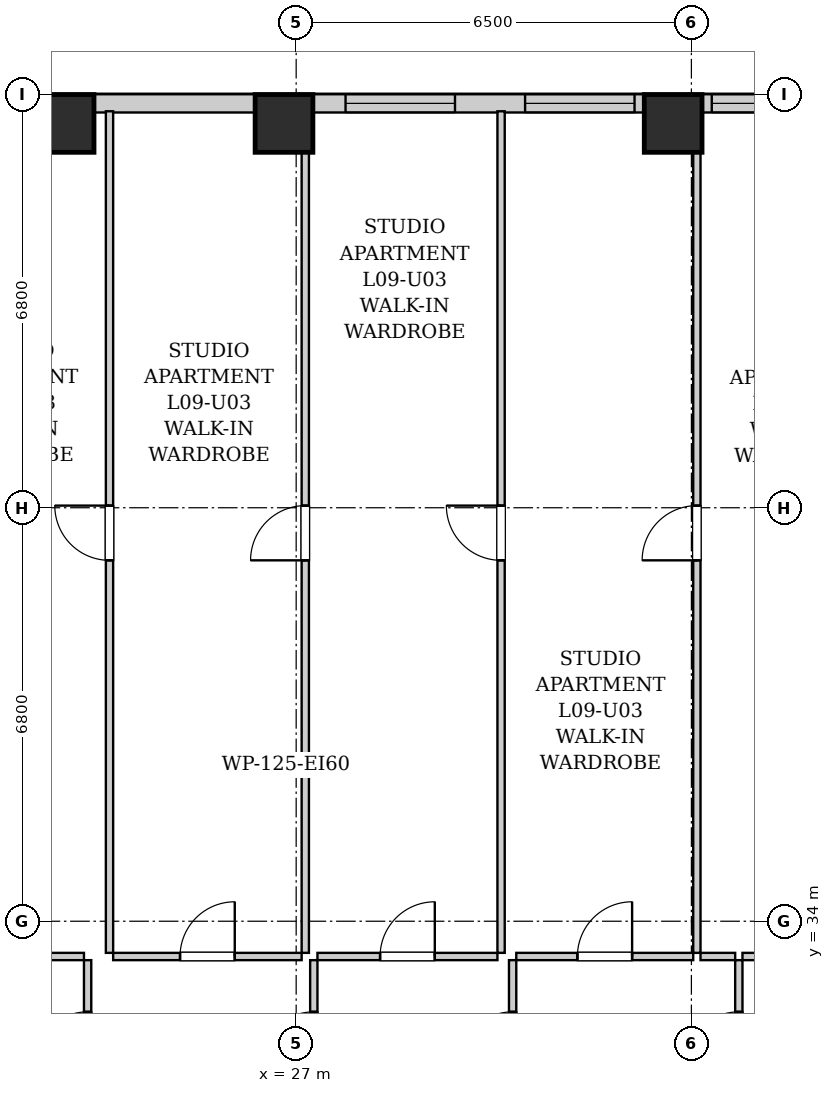
"""IFC4 building model, lengths in metres.
Left out: names, types, materials, properties, quantities, classifications, styles, units other than length and angle.
Written with IfcOpenShell. Run it as: python <this file> out.ifc"""

import sys

from ifc_helpers import new_model, si_unit, direction, frame, frame_2d, origin, origin_2d, place, context, subcontext, project, spatial, rectangle, extrude, element, fill, save


model = new_model("IFC4")
c1 = context("Model", 3, precision=1e-05, world=origin(), true_north=direction((0.0, 1.0)))
c2 = subcontext(c1, "Body", "Model", "MODEL_VIEW")
j1 = project(units=[si_unit("LENGTHUNIT", "METRE"), si_unit("PLANEANGLEUNIT", "RADIAN")], contexts=[c1])
p1 = place(None, origin())
s1 = spatial("IfcSite", under=j1, at=p1, CompositionType="ELEMENT")
p2 = place(p1, origin())
s2 = spatial("IfcBuilding", under=s1, at=p2, CompositionType="ELEMENT")
p3 = place(p2, frame((0.0, 0.0, 38.6)))
s3 = spatial("IfcBuildingStorey", under=s2, at=p3, CompositionType="ELEMENT", Elevation=38.6)
for number, where, z_axis, x_axis in (
    (1, (23.2, 47.12, 0.0), (0.0, 0.0, 1.0), (1.0, 0.0, 0.0)),
    (2, (26.8, 47.12, 0.0), (0.0, 0.0, 1.0), (1.0, 0.0, 0.0)),
    (3, (33.2, 47.12, 0.0), (0.0, 0.0, 1.0), (1.0, 0.0, 0.0)),
):
    element("IfcColumn", number, at=place(p3, frame(where, z_axis=z_axis, x_axis=x_axis)), inside=s3, PredefinedType="COLUMN", context=c2, shape_type="SweptSolid", body=[
        extrude(rectangle(XDim=0.95, YDim=0.95, at=origin_2d()), origin(), (0.0, 0.0, 1.0), 3.2),
    ])
p4 = place(p3, frame((10.0, 47.45, 0.0), z_axis=(0.0, 0.0, 1.0), x_axis=(1.0, 0.0, 0.0)))
e4 = element("IfcWall", 4, at=p4, inside=s3, PredefinedType="SOLIDWALL", context=c2, shape_type="SweptSolid", body=[
    extrude(rectangle(XDim=25.7, YDim=0.3, at=frame_2d((12.85, 0.0))), origin(), (0.0, 0.0, 1.0), 1.975),
])
p5 = place(p4, frame((1.73, 0.0, 0.55)))
e5 = element("IfcOpeningElement", 5, at=p5, cuts=e4, PredefinedType="OPENING", context=c2, shape_type="SweptSolid", body=[
    extrude(rectangle(XDim=1.8, YDim=1.2, at=frame_2d((0.9, 0.6))), frame((0.0, 0.16, 0.0), z_axis=(0.0, -1.0, 0.0), x_axis=(1.0, 0.0, 0.0)), (0.0, 0.0, 1.0), 0.32),
])
p6 = place(p4, frame((4.961, 0.0, 0.55)))
e6 = element("IfcOpeningElement", 6, at=p6, cuts=e4, PredefinedType="OPENING", context=c2, shape_type="SweptSolid", body=[
    extrude(rectangle(XDim=1.8, YDim=1.2, at=frame_2d((0.9, 0.6))), frame((0.0, 0.16, 0.0), z_axis=(0.0, -1.0, 0.0), x_axis=(1.0, 0.0, 0.0)), (0.0, 0.0, 1.0), 0.32),
])
p7 = place(p4, frame((8.435, 0.0, 0.55)))
e7 = element("IfcOpeningElement", 7, at=p7, cuts=e4, PredefinedType="OPENING", context=c2, shape_type="SweptSolid", body=[
    extrude(rectangle(XDim=1.8, YDim=1.2, at=frame_2d((0.9, 0.6))), frame((0.0, 0.16, 0.0), z_axis=(0.0, -1.0, 0.0), x_axis=(1.0, 0.0, 0.0)), (0.0, 0.0, 1.0), 0.32),
])
p8 = place(p4, frame((11.15, 0.0, 0.55)))
e8 = element("IfcOpeningElement", 8, at=p8, cuts=e4, PredefinedType="OPENING", context=c2, shape_type="SweptSolid", body=[
    extrude(rectangle(XDim=1.35, YDim=1.2, at=frame_2d((0.675, 0.6))), frame((0.0, 0.16, 0.0), z_axis=(0.0, -1.0, 0.0), x_axis=(1.0, 0.0, 0.0)), (0.0, 0.0, 1.0), 0.32),
])
p9 = place(p4, frame((17.812, 0.0, 0.55)))
e9 = element("IfcOpeningElement", 9, at=p9, cuts=e4, PredefinedType="OPENING", context=c2, shape_type="SweptSolid", body=[
    extrude(rectangle(XDim=1.8, YDim=1.2, at=frame_2d((0.9, 0.6))), frame((0.0, 0.16, 0.0), z_axis=(0.0, -1.0, 0.0), x_axis=(1.0, 0.0, 0.0)), (0.0, 0.0, 1.0), 0.32),
])
p10 = place(p4, frame((20.765, 0.0, 0.55)))
e10 = element("IfcOpeningElement", 10, at=p10, cuts=e4, PredefinedType="OPENING", context=c2, shape_type="SweptSolid", body=[
    extrude(rectangle(XDim=1.8, YDim=1.2, at=frame_2d((0.9, 0.6))), frame((0.0, 0.16, 0.0), z_axis=(0.0, -1.0, 0.0), x_axis=(1.0, 0.0, 0.0)), (0.0, 0.0, 1.0), 0.32),
])
p11 = place(p4, frame((23.835, 0.0, 0.55)))
e11 = element("IfcOpeningElement", 11, at=p11, cuts=e4, PredefinedType="OPENING", context=c2, shape_type="SweptSolid", body=[
    extrude(rectangle(XDim=1.35, YDim=1.2, at=frame_2d((0.675, 0.6))), frame((0.0, 0.16, 0.0), z_axis=(0.0, -1.0, 0.0), x_axis=(1.0, 0.0, 0.0)), (0.0, 0.0, 1.0), 0.32),
])
p12 = place(p3, frame((23.57, 30.76, 0.0), z_axis=(0.0, 0.0, 1.0), x_axis=(0.0, 1.0, 0.0)))
e12 = element("IfcWall", 12, at=p12, inside=s3, PredefinedType="PARTITIONING", context=c2, shape_type="SweptSolid", body=[
    extrude(rectangle(XDim=2.6, YDim=0.12, at=frame_2d((1.3, 0.0))), origin(), (0.0, 0.0, 1.0), 2.94),
])
p13 = place(p12, frame((0.85, 0.0, 0.0)))
e13 = element("IfcOpeningElement", 13, at=p13, cuts=e12, PredefinedType="OPENING", context=c2, shape_type="SweptSolid", body=[
    extrude(rectangle(XDim=0.9, YDim=2.05, at=frame_2d((0.45, 1.025))), frame((0.0, 0.07, 0.0), z_axis=(0.0, -1.0, 0.0), x_axis=(1.0, 0.0, 0.0)), (0.0, 0.0, 1.0), 0.14),
])
p14 = place(p3, frame((20.77, 33.42, 0.0), z_axis=(0.0, 0.0, 1.0), x_axis=(1.0, 0.0, 0.0)))
e14 = element("IfcWall", 14, at=p14, inside=s3, PredefinedType="PARTITIONING", context=c2, shape_type="SweptSolid", body=[
    extrude(rectangle(XDim=2.74, YDim=0.12, at=frame_2d((1.37, 0.0))), origin(), (0.0, 0.0, 1.0), 2.94),
])
p15 = place(p14, frame((0.92, 0.0, 0.0)))
e15 = element("IfcOpeningElement", 15, at=p15, cuts=e14, PredefinedType="OPENING", context=c2, shape_type="SweptSolid", body=[
    extrude(rectangle(XDim=0.9, YDim=2.05, at=frame_2d((0.45, 1.025))), frame((0.0, 0.07, 0.0), z_axis=(0.0, -1.0, 0.0), x_axis=(1.0, 0.0, 0.0)), (0.0, 0.0, 1.0), 0.14),
])
p16 = place(p3, frame((27.29, 30.76, 0.0), z_axis=(0.0, 0.0, 1.0), x_axis=(0.0, 1.0, 0.0)))
e16 = element("IfcWall", 16, at=p16, inside=s3, PredefinedType="PARTITIONING", context=c2, shape_type="SweptSolid", body=[
    extrude(rectangle(XDim=2.6, YDim=0.12, at=frame_2d((1.3, 0.0))), origin(), (0.0, 0.0, 1.0), 2.94),
])
p17 = place(p16, frame((0.85, 0.0, 0.0)))
e17 = element("IfcOpeningElement", 17, at=p17, cuts=e16, PredefinedType="OPENING", context=c2, shape_type="SweptSolid", body=[
    extrude(rectangle(XDim=0.9, YDim=2.05, at=frame_2d((0.45, 1.025))), frame((0.0, 0.07, 0.0), z_axis=(0.0, -1.0, 0.0), x_axis=(1.0, 0.0, 0.0)), (0.0, 0.0, 1.0), 0.14),
])
p18 = place(p3, frame((23.99, 33.42, 0.0), z_axis=(0.0, 0.0, 1.0), x_axis=(1.0, 0.0, 0.0)))
e18 = element("IfcWall", 18, at=p18, inside=s3, PredefinedType="PARTITIONING", context=c2, shape_type="SweptSolid", body=[
    extrude(rectangle(XDim=3.1, YDim=0.12, at=frame_2d((1.55, 0.0))), origin(), (0.0, 0.0, 1.0), 2.94),
])
p19 = place(p18, frame((1.1, 0.0, 0.0)))
e19 = element("IfcOpeningElement", 19, at=p19, cuts=e18, PredefinedType="OPENING", context=c2, shape_type="SweptSolid", body=[
    extrude(rectangle(XDim=0.9, YDim=2.05, at=frame_2d((0.45, 1.025))), frame((0.0, 0.07, 0.0), z_axis=(0.0, -1.0, 0.0), x_axis=(1.0, 0.0, 0.0)), (0.0, 0.0, 1.0), 0.14),
])
p20 = place(p3, frame((30.56, 30.76, 0.0), z_axis=(0.0, 0.0, 1.0), x_axis=(0.0, 1.0, 0.0)))
e20 = element("IfcWall", 20, at=p20, inside=s3, PredefinedType="PARTITIONING", context=c2, shape_type="SweptSolid", body=[
    extrude(rectangle(XDim=2.6, YDim=0.12, at=frame_2d((1.3, 0.0))), origin(), (0.0, 0.0, 1.0), 2.94),
])
p21 = place(p20, frame((0.85, 0.0, 0.0)))
e21 = element("IfcOpeningElement", 21, at=p21, cuts=e20, PredefinedType="OPENING", context=c2, shape_type="SweptSolid", body=[
    extrude(rectangle(XDim=0.9, YDim=2.05, at=frame_2d((0.45, 1.025))), frame((0.0, 0.07, 0.0), z_axis=(0.0, -1.0, 0.0), x_axis=(1.0, 0.0, 0.0)), (0.0, 0.0, 1.0), 0.14),
])
p22 = place(p3, frame((27.35, 33.42, 0.0), z_axis=(0.0, 0.0, 1.0), x_axis=(1.0, 0.0, 0.0)))
e22 = element("IfcWall", 22, at=p22, inside=s3, PredefinedType="PARTITIONING", context=c2, shape_type="SweptSolid", body=[
    extrude(rectangle(XDim=2.96, YDim=0.12, at=frame_2d((1.48, 0.0))), origin(), (0.0, 0.0, 1.0), 2.94),
])
p23 = place(p22, frame((1.03, 0.0, 0.0)))
e23 = element("IfcOpeningElement", 23, at=p23, cuts=e22, PredefinedType="OPENING", context=c2, shape_type="SweptSolid", body=[
    extrude(rectangle(XDim=0.9, YDim=2.05, at=frame_2d((0.45, 1.025))), frame((0.0, 0.07, 0.0), z_axis=(0.0, -1.0, 0.0), x_axis=(1.0, 0.0, 0.0)), (0.0, 0.0, 1.0), 0.14),
])
p24 = place(p3, frame((34.28, 30.76, 0.0), z_axis=(0.0, 0.0, 1.0), x_axis=(0.0, 1.0, 0.0)))
e24 = element("IfcWall", 24, at=p24, inside=s3, PredefinedType="PARTITIONING", context=c2, shape_type="SweptSolid", body=[
    extrude(rectangle(XDim=2.6, YDim=0.12, at=frame_2d((1.3, 0.0))), origin(), (0.0, 0.0, 1.0), 2.94),
])
p25 = place(p24, frame((0.85, 0.0, 0.0)))
e25 = element("IfcOpeningElement", 25, at=p25, cuts=e24, PredefinedType="OPENING", context=c2, shape_type="SweptSolid", body=[
    extrude(rectangle(XDim=0.9, YDim=2.05, at=frame_2d((0.45, 1.025))), frame((0.0, 0.07, 0.0), z_axis=(0.0, -1.0, 0.0), x_axis=(1.0, 0.0, 0.0)), (0.0, 0.0, 1.0), 0.14),
])
p26 = place(p3, frame((30.62, 33.42, 0.0), z_axis=(0.0, 0.0, 1.0), x_axis=(1.0, 0.0, 0.0)))
e26 = element("IfcWall", 26, at=p26, inside=s3, PredefinedType="PARTITIONING", context=c2, shape_type="SweptSolid", body=[
    extrude(rectangle(XDim=2.91, YDim=0.12, at=frame_2d((1.455, 0.0))), origin(), (0.0, 0.0, 1.0), 2.94),
])
p27 = place(p26, frame((1.005, 0.0, 0.0)))
e27 = element("IfcOpeningElement", 27, at=p27, cuts=e26, PredefinedType="OPENING", context=c2, shape_type="SweptSolid", body=[
    extrude(rectangle(XDim=0.9, YDim=2.05, at=frame_2d((0.45, 1.025))), frame((0.0, 0.07, 0.0), z_axis=(0.0, -1.0, 0.0), x_axis=(1.0, 0.0, 0.0)), (0.0, 0.0, 1.0), 0.14),
])
p28 = place(p3, frame((33.65, 33.42, 0.0), z_axis=(0.0, 0.0, 1.0), x_axis=(1.0, 0.0, 0.0)))
e28 = element("IfcWall", 28, at=p28, inside=s3, PredefinedType="PARTITIONING", context=c2, shape_type="SweptSolid", body=[
    extrude(rectangle(XDim=0.57, YDim=0.12, at=frame_2d((0.285, 0.0))), origin(), (0.0, 0.0, 1.0), 2.94),
])
p29 = place(p3, frame((34.34, 33.42, 0.0), z_axis=(0.0, 0.0, 1.0), x_axis=(1.0, 0.0, 0.0)))
e29 = element("IfcWall", 29, at=p29, inside=s3, PredefinedType="PARTITIONING", context=c2, shape_type="SweptSolid", body=[
    extrude(rectangle(XDim=2.41, YDim=0.12, at=frame_2d((1.205, 0.0))), origin(), (0.0, 0.0, 1.0), 2.94),
])
p30 = place(p29, frame((0.755, 0.0, 0.0)))
e30 = element("IfcOpeningElement", 30, at=p30, cuts=e29, PredefinedType="OPENING", context=c2, shape_type="SweptSolid", body=[
    extrude(rectangle(XDim=0.9, YDim=2.05, at=frame_2d((0.45, 1.025))), frame((0.0, 0.07, 0.0), z_axis=(0.0, -1.0, 0.0), x_axis=(1.0, 0.0, 0.0)), (0.0, 0.0, 1.0), 0.14),
])
p31 = place(p3, frame((23.93, 33.48, 0.0), z_axis=(0.0, 0.0, 1.0), x_axis=(0.0, 1.0, 0.0)))
e31 = element("IfcWall", 31, at=p31, inside=s3, PredefinedType="PARTITIONING", context=c2, shape_type="SweptSolid", body=[
    extrude(rectangle(XDim=13.84, YDim=0.12, at=frame_2d((6.92, 0.0))), origin(), (0.0, 0.0, 1.0), 2.94),
])
p32 = place(p31, frame((6.455, 0.0, 0.0)))
e32 = element("IfcOpeningElement", 32, at=p32, cuts=e31, PredefinedType="OPENING", context=c2, shape_type="SweptSolid", body=[
    extrude(rectangle(XDim=0.9, YDim=2.05, at=frame_2d((0.45, 1.025))), frame((0.0, 0.07, 0.0), z_axis=(0.0, -1.0, 0.0), x_axis=(1.0, 0.0, 0.0)), (0.0, 0.0, 1.0), 0.14),
])
p33 = place(p3, frame((27.15, 33.48, 0.0), z_axis=(0.0, 0.0, 1.0), x_axis=(0.0, 1.0, 0.0)))
e33 = element("IfcWall", 33, at=p33, inside=s3, PredefinedType="PARTITIONING", context=c2, shape_type="SweptSolid", body=[
    extrude(rectangle(XDim=13.84, YDim=0.12, at=frame_2d((6.92, 0.0))), origin(), (0.0, 0.0, 1.0), 2.94),
])
p34 = place(p33, frame((6.455, 0.0, 0.0)))
e34 = element("IfcOpeningElement", 34, at=p34, cuts=e33, PredefinedType="OPENING", context=c2, shape_type="SweptSolid", body=[
    extrude(rectangle(XDim=0.9, YDim=2.05, at=frame_2d((0.45, 1.025))), frame((0.0, 0.07, 0.0), z_axis=(0.0, -1.0, 0.0), x_axis=(1.0, 0.0, 0.0)), (0.0, 0.0, 1.0), 0.14),
])
p35 = place(p3, frame((30.37, 33.48, 0.0), z_axis=(0.0, 0.0, 1.0), x_axis=(0.0, 1.0, 0.0)))
e35 = element("IfcWall", 35, at=p35, inside=s3, PredefinedType="PARTITIONING", context=c2, shape_type="SweptSolid", body=[
    extrude(rectangle(XDim=13.84, YDim=0.12, at=frame_2d((6.92, 0.0))), origin(), (0.0, 0.0, 1.0), 2.94),
])
p36 = place(p35, frame((6.455, 0.0, 0.0)))
e36 = element("IfcOpeningElement", 36, at=p36, cuts=e35, PredefinedType="OPENING", context=c2, shape_type="SweptSolid", body=[
    extrude(rectangle(XDim=0.9, YDim=2.05, at=frame_2d((0.45, 1.025))), frame((0.0, 0.07, 0.0), z_axis=(0.0, -1.0, 0.0), x_axis=(1.0, 0.0, 0.0)), (0.0, 0.0, 1.0), 0.14),
])
p37 = place(p3, frame((33.59, 33.48, 0.0), z_axis=(0.0, 0.0, 1.0), x_axis=(0.0, 1.0, 0.0)))
e37 = element("IfcWall", 37, at=p37, inside=s3, PredefinedType="PARTITIONING", context=c2, shape_type="SweptSolid", body=[
    extrude(rectangle(XDim=13.84, YDim=0.12, at=frame_2d((6.92, 0.0))), origin(), (0.0, 0.0, 1.0), 2.94),
])
p38 = place(p37, frame((6.455, 0.0, 0.0)))
e38 = element("IfcOpeningElement", 38, at=p38, cuts=e37, PredefinedType="OPENING", context=c2, shape_type="SweptSolid", body=[
    extrude(rectangle(XDim=0.9, YDim=2.05, at=frame_2d((0.45, 1.025))), frame((0.0, 0.07, 0.0), z_axis=(0.0, -1.0, 0.0), x_axis=(1.0, 0.0, 0.0)), (0.0, 0.0, 1.0), 0.14),
])
p39 = place(p13, origin())
e39 = element("IfcDoor", 39, at=p39, inside=s3, OperationType="SINGLE_SWING_LEFT", PredefinedType="DOOR", context=c2, shape_type="SweptSolid", body=[
    extrude(rectangle(XDim=0.9, YDim=2.05, at=frame_2d((0.45, 1.025))), frame((0.0, 0.025, 0.0), z_axis=(0.0, -1.0, 0.0), x_axis=(1.0, 0.0, 0.0)), (0.0, 0.0, 1.0), 0.05),
])
fill(e13, e39)
p40 = place(p17, origin())
e40 = element("IfcDoor", 40, at=p40, inside=s3, OperationType="SINGLE_SWING_LEFT", PredefinedType="DOOR", context=c2, shape_type="SweptSolid", body=[
    extrude(rectangle(XDim=0.9, YDim=2.05, at=frame_2d((0.45, 1.025))), frame((0.0, 0.025, 0.0), z_axis=(0.0, -1.0, 0.0), x_axis=(1.0, 0.0, 0.0)), (0.0, 0.0, 1.0), 0.05),
])
fill(e17, e40)
p41 = place(p19, origin())
e41 = element("IfcDoor", 41, at=p41, inside=s3, OperationType="SINGLE_SWING_RIGHT", PredefinedType="DOOR", context=c2, shape_type="SweptSolid", body=[
    extrude(rectangle(XDim=0.9, YDim=2.05, at=frame_2d((0.45, 1.025))), frame((0.0, 0.025, 0.0), z_axis=(0.0, -1.0, 0.0), x_axis=(1.0, 0.0, 0.0)), (0.0, 0.0, 1.0), 0.05),
])
fill(e19, e41)
p42 = place(p21, origin())
e42 = element("IfcDoor", 42, at=p42, inside=s3, OperationType="SINGLE_SWING_LEFT", PredefinedType="DOOR", context=c2, shape_type="SweptSolid", body=[
    extrude(rectangle(XDim=0.9, YDim=2.05, at=frame_2d((0.45, 1.025))), frame((0.0, 0.025, 0.0), z_axis=(0.0, -1.0, 0.0), x_axis=(1.0, 0.0, 0.0)), (0.0, 0.0, 1.0), 0.05),
])
fill(e21, e42)
p43 = place(p23, origin())
e43 = element("IfcDoor", 43, at=p43, inside=s3, OperationType="SINGLE_SWING_RIGHT", PredefinedType="DOOR", context=c2, shape_type="SweptSolid", body=[
    extrude(rectangle(XDim=0.9, YDim=2.05, at=frame_2d((0.45, 1.025))), frame((0.0, 0.025, 0.0), z_axis=(0.0, -1.0, 0.0), x_axis=(1.0, 0.0, 0.0)), (0.0, 0.0, 1.0), 0.05),
])
fill(e23, e43)
p44 = place(p25, origin())
e44 = element("IfcDoor", 44, at=p44, inside=s3, OperationType="SINGLE_SWING_LEFT", PredefinedType="DOOR", context=c2, shape_type="SweptSolid", body=[
    extrude(rectangle(XDim=0.9, YDim=2.05, at=frame_2d((0.45, 1.025))), frame((0.0, 0.025, 0.0), z_axis=(0.0, -1.0, 0.0), x_axis=(1.0, 0.0, 0.0)), (0.0, 0.0, 1.0), 0.05),
])
fill(e25, e44)
p45 = place(p27, origin())
e45 = element("IfcDoor", 45, at=p45, inside=s3, OperationType="SINGLE_SWING_RIGHT", PredefinedType="DOOR", context=c2, shape_type="SweptSolid", body=[
    extrude(rectangle(XDim=0.9, YDim=2.05, at=frame_2d((0.45, 1.025))), frame((0.0, 0.025, 0.0), z_axis=(0.0, -1.0, 0.0), x_axis=(1.0, 0.0, 0.0)), (0.0, 0.0, 1.0), 0.05),
])
fill(e27, e45)
p46 = place(p32, origin())
e46 = element("IfcDoor", 46, at=p46, inside=s3, OperationType="SINGLE_SWING_RIGHT", PredefinedType="DOOR", context=c2, shape_type="SweptSolid", body=[
    extrude(rectangle(XDim=0.9, YDim=2.05, at=frame_2d((0.45, 1.025))), frame((0.0, 0.025, 0.0), z_axis=(0.0, -1.0, 0.0), x_axis=(1.0, 0.0, 0.0)), (0.0, 0.0, 1.0), 0.05),
])
fill(e32, e46)
p47 = place(p34, origin())
e47 = element("IfcDoor", 47, at=p47, inside=s3, OperationType="SINGLE_SWING_LEFT", PredefinedType="DOOR", context=c2, shape_type="SweptSolid", body=[
    extrude(rectangle(XDim=0.9, YDim=2.05, at=frame_2d((0.45, 1.025))), frame((0.0, 0.025, 0.0), z_axis=(0.0, -1.0, 0.0), x_axis=(1.0, 0.0, 0.0)), (0.0, 0.0, 1.0), 0.05),
])
fill(e34, e47)
p48 = place(p36, origin())
e48 = element("IfcDoor", 48, at=p48, inside=s3, OperationType="SINGLE_SWING_RIGHT", PredefinedType="DOOR", context=c2, shape_type="SweptSolid", body=[
    extrude(rectangle(XDim=0.9, YDim=2.05, at=frame_2d((0.45, 1.025))), frame((0.0, 0.025, 0.0), z_axis=(0.0, -1.0, 0.0), x_axis=(1.0, 0.0, 0.0)), (0.0, 0.0, 1.0), 0.05),
])
fill(e36, e48)
p49 = place(p38, origin())
e49 = element("IfcDoor", 49, at=p49, inside=s3, OperationType="SINGLE_SWING_LEFT", PredefinedType="DOOR", context=c2, shape_type="SweptSolid", body=[
    extrude(rectangle(XDim=0.9, YDim=2.05, at=frame_2d((0.45, 1.025))), frame((0.0, 0.025, 0.0), z_axis=(0.0, -1.0, 0.0), x_axis=(1.0, 0.0, 0.0)), (0.0, 0.0, 1.0), 0.05),
])
fill(e38, e49)
p50 = place(p9, origin())
e50 = element("IfcWindow", 50, at=p50, inside=s3, PartitioningType="DOUBLE_PANEL_VERTICAL", PredefinedType="WINDOW", context=c2, shape_type="SweptSolid", body=[
    extrude(rectangle(XDim=1.8, YDim=1.2, at=frame_2d((0.9, 0.6))), frame((0.0, 0.03, 0.0), z_axis=(0.0, -1.0, 0.0), x_axis=(1.0, 0.0, 0.0)), (0.0, 0.0, 1.0), 0.06),
])
fill(e9, e50)
p51 = place(p10, origin())
e51 = element("IfcWindow", 51, at=p51, inside=s3, PartitioningType="DOUBLE_PANEL_VERTICAL", PredefinedType="WINDOW", context=c2, shape_type="SweptSolid", body=[
    extrude(rectangle(XDim=1.8, YDim=1.2, at=frame_2d((0.9, 0.6))), frame((0.0, 0.03, 0.0), z_axis=(0.0, -1.0, 0.0), x_axis=(1.0, 0.0, 0.0)), (0.0, 0.0, 1.0), 0.06),
])
fill(e10, e51)
p52 = place(p11, origin())
e52 = element("IfcWindow", 52, at=p52, inside=s3, PartitioningType="SINGLE_PANEL", PredefinedType="WINDOW", context=c2, shape_type="SweptSolid", body=[
    extrude(rectangle(XDim=1.35, YDim=1.2, at=frame_2d((0.675, 0.6))), frame((0.0, 0.03, 0.0), z_axis=(0.0, -1.0, 0.0), x_axis=(1.0, 0.0, 0.0)), (0.0, 0.0, 1.0), 0.06),
])
fill(e11, e52)
save(model, sys.argv[1])
